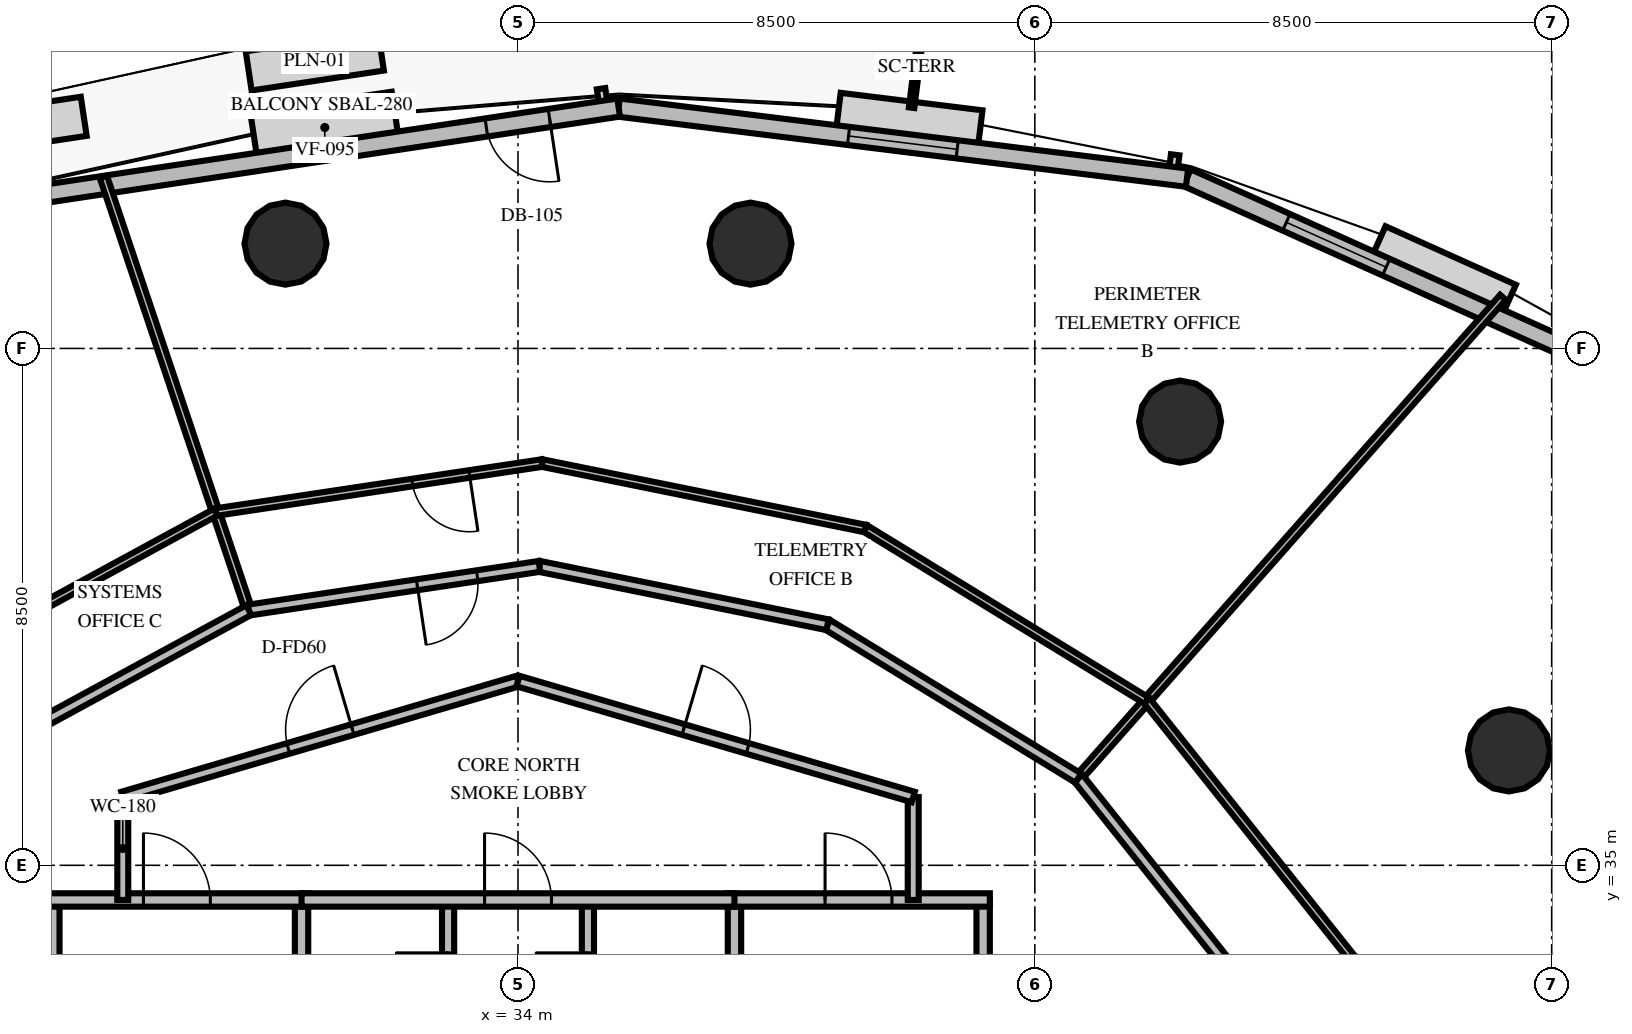
"""IFC4 building model, lengths in metres.
Left out: names, types, materials, properties, quantities, classifications, styles, units other than length and angle.
Written with IfcOpenShell. Run it as: python <this file> out.ifc"""

import sys

from ifc_helpers import new_model, si_unit, direction, frame, frame_2d, origin, origin_2d, place, context, subcontext, project, spatial, rectangle, circle, extrude, element, fill, save


model = new_model("IFC4")
c1 = context("Model", 3, precision=1e-05, world=origin(), true_north=direction((0.0, 1.0)))
c2 = subcontext(c1, "Body", "Model", "MODEL_VIEW")
j1 = project(units=[si_unit("LENGTHUNIT", "METRE"), si_unit("PLANEANGLEUNIT", "RADIAN")], contexts=[c1])
p1 = place(None, origin())
s1 = spatial("IfcSite", under=j1, at=p1, CompositionType="ELEMENT")
p2 = place(p1, origin())
s2 = spatial("IfcBuilding", under=s1, at=p2, CompositionType="ELEMENT")
p3 = place(p2, frame((0.0, 0.0, 67.8)))
s3 = spatial("IfcBuildingStorey", under=s2, at=p3, CompositionType="ELEMENT", Elevation=67.8)
for number, where, z_axis, x_axis in (
    (1, (50.297, 36.889, 0.0), (0.0, 0.0, 1.0), (1.0, 0.0, 0.0)),
    (2, (44.889, 42.297, 0.0), (0.0, 0.0, 1.0), (1.0, 0.0, 0.0)),
    (3, (37.824, 45.223, 0.0), (0.0, 0.0, 1.0), (1.0, 0.0, 0.0)),
    (4, (30.176, 45.223, 0.0), (0.0, 0.0, 1.0), (1.0, 0.0, 0.0)),
):
    element("IfcColumn", number, at=place(p3, frame(where, z_axis=z_axis, x_axis=x_axis)), inside=s3, PredefinedType="COLUMN", context=c2, shape_type="SweptSolid", body=[
        extrude(circle(Radius=0.675, at=origin_2d()), origin(), (0.0, 0.0, 1.0), 4.2),
    ])
p4 = place(p3, frame((53.024, 42.705, 0.0), z_axis=(0.0, 0.0, 1.0), x_axis=(-0.912205999873, 0.409731880376, 0.0)))
e5 = element("IfcWall", 5, at=p4, inside=s3, PredefinedType="SOLIDWALL", context=c2, shape_type="SweptSolid", body=[
    extrude(rectangle(XDim=8.792, YDim=0.3, at=frame_2d((4.396, 0.0))), origin(), (0.0, 0.0, 1.0), 3.0),
])
p5 = place(p4, frame((5.202, 0.0, 0.8)))
e6 = element("IfcOpeningElement", 6, at=p5, cuts=e5, PredefinedType="OPENING", context=c2, shape_type="SweptSolid", body=[
    extrude(rectangle(XDim=1.8, YDim=1.95, at=frame_2d((0.9, 0.975))), frame((0.0, 0.16, 0.0), z_axis=(0.0, -1.0, 0.0), x_axis=(1.0, 0.0, 0.0)), (0.0, 0.0, 1.0), 0.32),
])
p6 = place(p3, frame((45.003, 46.308, 0.0), z_axis=(0.0, 0.0, 1.0), x_axis=(-0.992477952792, 0.122423499466, 0.0)))
e7 = element("IfcWall", 7, at=p6, inside=s3, PredefinedType="SOLIDWALL", context=c2, shape_type="SweptSolid", body=[
    extrude(rectangle(XDim=9.419, YDim=0.3, at=frame_2d((4.709, 0.0))), origin(), (0.0, 0.0, 1.0), 3.0),
])
p7 = place(p6, frame((3.809, 0.0, 0.8)))
e8 = element("IfcOpeningElement", 8, at=p7, cuts=e7, PredefinedType="OPENING", context=c2, shape_type="SweptSolid", body=[
    extrude(rectangle(XDim=1.8, YDim=1.95, at=frame_2d((0.9, 0.975))), frame((0.0, 0.16, 0.0), z_axis=(0.0, -1.0, 0.0), x_axis=(1.0, 0.0, 0.0)), (0.0, 0.0, 1.0), 0.32),
])
p8 = place(p3, frame((35.655, 47.461, 0.0), z_axis=(0.0, 0.0, 1.0), x_axis=(-0.988888262402, -0.148660702551, 0.0)))
e9 = element("IfcWall", 9, at=p8, inside=s3, PredefinedType="SOLIDWALL", context=c2, shape_type="SweptSolid", body=[
    extrude(rectangle(XDim=9.655, YDim=0.3, at=frame_2d((4.827, 0.0))), origin(), (0.0, 0.0, 1.0), 3.0),
])
p9 = place(p8, frame((1.15, 0.0, 0.0)))
e10 = element("IfcOpeningElement", 10, at=p9, cuts=e9, PredefinedType="OPENING", context=c2, shape_type="SweptSolid", body=[
    extrude(rectangle(XDim=1.05, YDim=2.15, at=frame_2d((0.525, 1.075))), frame((0.0, 0.16, 0.0), z_axis=(0.0, -1.0, 0.0), x_axis=(1.0, 0.0, 0.0)), (0.0, 0.0, 1.0), 0.32),
])
p10 = place(p3, frame((26.35, 30.05, 0.0), z_axis=(0.0, 0.0, 1.0), x_axis=(0.0, 1.0, 0.0)))
e11 = element("IfcWall", 11, at=p10, inside=s3, PredefinedType="SOLIDWALL", context=c2, shape_type="SweptSolid", body=[
    extrude(rectangle(XDim=4.38, YDim=0.22, at=frame_2d((2.19, 0.0))), origin(), (0.0, 0.0, 1.0), 3.0),
])
p11 = place(p3, frame((30.44, 30.05, 0.0), z_axis=(0.0, 0.0, 1.0), x_axis=(0.0, 1.0, 0.0)))
e12 = element("IfcWall", 12, at=p11, inside=s3, PredefinedType="SOLIDWALL", context=c2, shape_type="SweptSolid", body=[
    extrude(rectangle(XDim=4.38, YDim=0.22, at=frame_2d((2.19, 0.0))), origin(), (0.0, 0.0, 1.0), 3.0),
])
p12 = place(p11, frame((0.8, 0.0, 0.0)))
e13 = element("IfcOpeningElement", 13, at=p12, cuts=e12, PredefinedType="OPENING", context=c2, shape_type="SweptSolid", body=[
    extrude(rectangle(XDim=1.05, YDim=2.1, at=frame_2d((0.525, 1.05))), frame((0.0, 0.12, 0.0), z_axis=(0.0, -1.0, 0.0), x_axis=(1.0, 0.0, 0.0)), (0.0, 0.0, 1.0), 0.24),
])
p13 = place(p3, frame((26.24, 34.43, 0.0), z_axis=(0.0, 0.0, 1.0), x_axis=(1.0, 0.0, 0.0)))
e14 = element("IfcWall", 14, at=p13, inside=s3, PredefinedType="SOLIDWALL", context=c2, shape_type="SweptSolid", body=[
    extrude(rectangle(XDim=4.31, YDim=0.22, at=frame_2d((2.155, 0.0))), origin(), (0.0, 0.0, 1.0), 3.0),
])
p14 = place(p13, frame((1.6, 0.0, 0.0)))
e15 = element("IfcOpeningElement", 15, at=p14, cuts=e14, PredefinedType="OPENING", context=c2, shape_type="SweptSolid", body=[
    extrude(rectangle(XDim=1.1, YDim=2.15, at=frame_2d((0.55, 1.075))), frame((0.0, 0.12, 0.0), z_axis=(0.0, -1.0, 0.0), x_axis=(1.0, 0.0, 0.0)), (0.0, 0.0, 1.0), 0.24),
])
p15 = place(p3, frame((32.85, 30.05, 0.0), z_axis=(0.0, 0.0, 1.0), x_axis=(0.0, 1.0, 0.0)))
e16 = element("IfcWall", 16, at=p15, inside=s3, PredefinedType="SOLIDWALL", context=c2, shape_type="SweptSolid", body=[
    extrude(rectangle(XDim=4.38, YDim=0.2, at=frame_2d((2.19, 0.0))), origin(), (0.0, 0.0, 1.0), 3.0),
])
p16 = place(p15, frame((2.65, 0.0, 0.0)))
e17 = element("IfcOpeningElement", 17, at=p16, cuts=e16, PredefinedType="OPENING", context=c2, shape_type="SweptSolid", body=[
    extrude(rectangle(XDim=0.86, YDim=2.05, at=frame_2d((0.43, 1.025))), frame((0.0, 0.11, 0.0), z_axis=(0.0, -1.0, 0.0), x_axis=(1.0, 0.0, 0.0)), (0.0, 0.0, 1.0), 0.22),
])
p17 = place(p3, frame((37.56, 30.05, 0.0), z_axis=(0.0, 0.0, 1.0), x_axis=(0.0, 1.0, 0.0)))
e18 = element("IfcWall", 18, at=p17, inside=s3, PredefinedType="SOLIDWALL", context=c2, shape_type="SweptSolid", body=[
    extrude(rectangle(XDim=4.38, YDim=0.22, at=frame_2d((2.19, 0.0))), origin(), (0.0, 0.0, 1.0), 3.0),
])
p18 = place(p17, frame((0.8, 0.0, 0.0)))
e19 = element("IfcOpeningElement", 19, at=p18, cuts=e18, PredefinedType="OPENING", context=c2, shape_type="SweptSolid", body=[
    extrude(rectangle(XDim=1.05, YDim=2.1, at=frame_2d((0.525, 1.05))), frame((0.0, 0.12, 0.0), z_axis=(0.0, -1.0, 0.0), x_axis=(1.0, 0.0, 0.0)), (0.0, 0.0, 1.0), 0.24),
])
p19 = place(p3, frame((41.65, 30.05, 0.0), z_axis=(0.0, 0.0, 1.0), x_axis=(0.0, 1.0, 0.0)))
e20 = element("IfcWall", 20, at=p19, inside=s3, PredefinedType="SOLIDWALL", context=c2, shape_type="SweptSolid", body=[
    extrude(rectangle(XDim=4.38, YDim=0.22, at=frame_2d((2.19, 0.0))), origin(), (0.0, 0.0, 1.0), 3.0),
])
p20 = place(p3, frame((37.45, 34.43, 0.0), z_axis=(0.0, 0.0, 1.0), x_axis=(1.0, 0.0, 0.0)))
e21 = element("IfcWall", 21, at=p20, inside=s3, PredefinedType="SOLIDWALL", context=c2, shape_type="SweptSolid", body=[
    extrude(rectangle(XDim=4.31, YDim=0.22, at=frame_2d((2.155, 0.0))), origin(), (0.0, 0.0, 1.0), 3.0),
])
p21 = place(p20, frame((1.6, 0.0, 0.0)))
e22 = element("IfcOpeningElement", 22, at=p21, cuts=e21, PredefinedType="OPENING", context=c2, shape_type="SweptSolid", body=[
    extrude(rectangle(XDim=1.1, YDim=2.15, at=frame_2d((0.55, 1.075))), frame((0.0, 0.12, 0.0), z_axis=(0.0, -1.0, 0.0), x_axis=(1.0, 0.0, 0.0)), (0.0, 0.0, 1.0), 0.24),
])
p22 = place(p3, frame((35.15, 30.05, 0.0), z_axis=(0.0, 0.0, 1.0), x_axis=(0.0, 1.0, 0.0)))
e23 = element("IfcWall", 23, at=p22, inside=s3, PredefinedType="SOLIDWALL", context=c2, shape_type="SweptSolid", body=[
    extrude(rectangle(XDim=4.38, YDim=0.2, at=frame_2d((2.19, 0.0))), origin(), (0.0, 0.0, 1.0), 3.0),
])
p23 = place(p22, frame((2.65, 0.0, 0.0)))
e24 = element("IfcOpeningElement", 24, at=p23, cuts=e23, PredefinedType="OPENING", context=c2, shape_type="SweptSolid", body=[
    extrude(rectangle(XDim=0.86, YDim=2.05, at=frame_2d((0.43, 1.025))), frame((0.0, 0.11, 0.0), z_axis=(0.0, -1.0, 0.0), x_axis=(1.0, 0.0, 0.0)), (0.0, 0.0, 1.0), 0.22),
])
p24 = place(p3, frame((30.44, 34.43, 0.0), z_axis=(0.0, 0.0, 1.0), x_axis=(1.0, 0.0, 0.0)))
e25 = element("IfcWall", 25, at=p24, inside=s3, PredefinedType="SOLIDWALL", context=c2, shape_type="SweptSolid", body=[
    extrude(rectangle(XDim=7.12, YDim=0.22, at=frame_2d((3.56, 0.0))), origin(), (0.0, 0.0, 1.0), 3.0),
])
p25 = place(p24, frame((3.01, 0.0, 0.0)))
e26 = element("IfcOpeningElement", 26, at=p25, cuts=e25, PredefinedType="OPENING", context=c2, shape_type="SweptSolid", body=[
    extrude(rectangle(XDim=1.1, YDim=2.15, at=frame_2d((0.55, 1.075))), frame((0.0, 0.12, 0.0), z_axis=(0.0, -1.0, 0.0), x_axis=(1.0, 0.0, 0.0)), (0.0, 0.0, 1.0), 0.24),
])
for number, where, z_axis, x_axis in (
    (27, (27.5, 34.43, 0.0), (0.0, 0.0, 1.0), (0.0, 1.0, 0.0)),
    (28, (40.5, 36.123, 0.0), (0.0, 0.0, 1.0), (0.0, -1.0, 0.0)),
):
    element("IfcWall", number, at=place(p3, frame(where, z_axis=z_axis, x_axis=x_axis)), inside=s3, PredefinedType="PARTITIONING", context=c2, shape_type="SweptSolid", body=[
        extrude(rectangle(XDim=1.693, YDim=0.18, at=frame_2d((0.846, 0.0))), origin(), (0.0, 0.0, 1.0), 3.0),
    ])
p26 = place(p3, frame((27.5, 36.123, 0.0), z_axis=(0.0, 0.0, 1.0), x_axis=(0.959546654541, 0.281549671923, 0.0)))
e29 = element("IfcWall", 29, at=p26, inside=s3, PredefinedType="PARTITIONING", context=c2, shape_type="SweptSolid", body=[
    extrude(rectangle(XDim=6.774, YDim=0.18, at=frame_2d((3.387, 0.0))), origin(), (0.0, 0.0, 1.0), 3.0),
])
p27 = place(p26, frame((2.837, 0.0, 0.0)))
e30 = element("IfcOpeningElement", 30, at=p27, cuts=e29, PredefinedType="OPENING", context=c2, shape_type="SweptSolid", body=[
    extrude(rectangle(XDim=1.1, YDim=2.15, at=frame_2d((0.55, 1.075))), frame((0.0, 0.1, 0.0), z_axis=(0.0, -1.0, 0.0), x_axis=(1.0, 0.0, 0.0)), (0.0, 0.0, 1.0), 0.2),
])
p28 = place(p3, frame((34.0, 38.03, 0.0), z_axis=(0.0, 0.0, 1.0), x_axis=(0.959546654541, -0.281549671923, 0.0)))
e31 = element("IfcWall", 31, at=p28, inside=s3, PredefinedType="PARTITIONING", context=c2, shape_type="SweptSolid", body=[
    extrude(rectangle(XDim=6.774, YDim=0.18, at=frame_2d((3.387, 0.0))), origin(), (0.0, 0.0, 1.0), 3.0),
])
p29 = place(p28, frame((2.837, 0.0, 0.0)))
e32 = element("IfcOpeningElement", 32, at=p29, cuts=e31, PredefinedType="OPENING", context=c2, shape_type="SweptSolid", body=[
    extrude(rectangle(XDim=1.1, YDim=2.15, at=frame_2d((0.55, 1.075))), frame((0.0, 0.1, 0.0), z_axis=(0.0, -1.0, 0.0), x_axis=(1.0, 0.0, 0.0)), (0.0, 0.0, 1.0), 0.2),
])
p30 = place(p3, frame((43.215, 36.434, 0.0), z_axis=(0.0, 0.0, 1.0), x_axis=(0.66196750906, 0.749532532282, 0.0)))
e33 = element("IfcWall", 33, at=p30, inside=s3, PredefinedType="PARTITIONING", context=c2, shape_type="SweptSolid", body=[
    extrude(rectangle(XDim=10.55, YDim=0.125, at=frame_2d((5.275, 0.0))), origin(), (0.0, 0.0, 1.0), 3.0),
])
p31 = place(p3, frame((46.227, 32.653, 0.0), z_axis=(0.0, 0.0, 1.0), x_axis=(-0.623166544039, 0.782089162685, 0.0)))
e34 = element("IfcWall", 34, at=p31, inside=s3, PredefinedType="PARTITIONING", context=c2, shape_type="SweptSolid", body=[
    extrude(rectangle(XDim=4.834, YDim=0.18, at=frame_2d((2.417, 0.0))), origin(), (0.0, 0.0, 1.0), 3.0),
])
p32 = place(p3, frame((47.721, 33.465, 0.0), z_axis=(0.0, 0.0, 1.0), x_axis=(-0.623201124623, 0.782061607719, 0.0)))
e35 = element("IfcWall", 35, at=p32, inside=s3, PredefinedType="PARTITIONING", context=c2, shape_type="SweptSolid", body=[
    extrude(rectangle(XDim=5.425, YDim=0.125, at=frame_2d((2.712, 0.0))), origin(), (0.0, 0.0, 1.0), 3.0),
])
p33 = place(p3, frame((29.572, 39.197, 0.0), z_axis=(0.0, 0.0, 1.0), x_axis=(-0.318127905721, 0.948047802382, 0.0)))
e36 = element("IfcWall", 36, at=p33, inside=s3, PredefinedType="PARTITIONING", context=c2, shape_type="SweptSolid", body=[
    extrude(rectangle(XDim=7.514, YDim=0.125, at=frame_2d((3.757, 0.0))), origin(), (0.0, 0.0, 1.0), 3.0),
])
p34 = place(p3, frame((43.215, 36.434, 0.0), z_axis=(0.0, 0.0, 1.0), x_axis=(-0.853113263306, 0.521725751685, 0.0)))
e37 = element("IfcWall", 37, at=p34, inside=s3, PredefinedType="PARTITIONING", context=c2, shape_type="SweptSolid", body=[
    extrude(rectangle(XDim=4.834, YDim=0.18, at=frame_2d((2.417, 0.0))), origin(), (0.0, 0.0, 1.0), 3.0),
])
p35 = place(p3, frame((39.09, 38.956, 0.0), z_axis=(0.0, 0.0, 1.0), x_axis=(-0.98009600445, 0.198524109522, 0.0)))
e38 = element("IfcWall", 38, at=p35, inside=s3, PredefinedType="PARTITIONING", context=c2, shape_type="SweptSolid", body=[
    extrude(rectangle(XDim=4.834, YDim=0.18, at=frame_2d((2.417, 0.0))), origin(), (0.0, 0.0, 1.0), 3.0),
])
p36 = place(p3, frame((34.352, 39.916, 0.0), z_axis=(0.0, 0.0, 1.0), x_axis=(-0.988886662028, -0.14867134782, 0.0)))
e39 = element("IfcWall", 39, at=p36, inside=s3, PredefinedType="PARTITIONING", context=c2, shape_type="SweptSolid", body=[
    extrude(rectangle(XDim=4.834, YDim=0.18, at=frame_2d((2.417, 0.0))), origin(), (0.0, 0.0, 1.0), 3.0),
])
p37 = place(p36, frame((1.034, 0.0, 0.0)))
e40 = element("IfcOpeningElement", 40, at=p37, cuts=e39, PredefinedType="OPENING", context=c2, shape_type="SweptSolid", body=[
    extrude(rectangle(XDim=1.0, YDim=2.15, at=frame_2d((0.5, 1.075))), frame((0.0, 0.1, 0.0), z_axis=(0.0, -1.0, 0.0), x_axis=(1.0, 0.0, 0.0)), (0.0, 0.0, 1.0), 0.2),
])
p38 = place(p3, frame((44.34, 37.708, 0.0), z_axis=(0.0, 0.0, 1.0), x_axis=(-0.853093763248, 0.521757636367, 0.0)))
e41 = element("IfcWall", 41, at=p38, inside=s3, PredefinedType="PARTITIONING", context=c2, shape_type="SweptSolid", body=[
    extrude(rectangle(XDim=5.425, YDim=0.125, at=frame_2d((2.712, 0.0))), origin(), (0.0, 0.0, 1.0), 3.0),
])
p39 = place(p3, frame((39.712, 40.538, 0.0), z_axis=(0.0, 0.0, 1.0), x_axis=(-0.980098278916, 0.198512880352, 0.0)))
e42 = element("IfcWall", 42, at=p39, inside=s3, PredefinedType="PARTITIONING", context=c2, shape_type="SweptSolid", body=[
    extrude(rectangle(XDim=5.425, YDim=0.125, at=frame_2d((2.712, 0.0))), origin(), (0.0, 0.0, 1.0), 3.0),
])
p40 = place(p3, frame((34.395, 41.615, 0.0), z_axis=(0.0, 0.0, 1.0), x_axis=(-0.988889758913, -0.148650747449, 0.0)))
e43 = element("IfcWall", 43, at=p40, inside=s3, PredefinedType="PARTITIONING", context=c2, shape_type="SweptSolid", body=[
    extrude(rectangle(XDim=5.425, YDim=0.125, at=frame_2d((2.712, 0.0))), origin(), (0.0, 0.0, 1.0), 3.0),
])
p41 = place(p40, frame((1.209, 0.0, 0.0)))
e44 = element("IfcOpeningElement", 44, at=p41, cuts=e43, PredefinedType="OPENING", context=c2, shape_type="SweptSolid", body=[
    extrude(rectangle(XDim=0.95, YDim=2.15, at=frame_2d((0.475, 1.075))), frame((0.0, 0.073, 0.0), z_axis=(0.0, -1.0, 0.0), x_axis=(1.0, 0.0, 0.0)), (0.0, 0.0, 1.0), 0.145),
])
p42 = place(p3, frame((29.572, 39.197, 0.0), z_axis=(0.0, 0.0, 1.0), x_axis=(-0.878385338365, -0.477953133001, 0.0)))
e45 = element("IfcWall", 45, at=p42, inside=s3, PredefinedType="PARTITIONING", context=c2, shape_type="SweptSolid", body=[
    extrude(rectangle(XDim=4.834, YDim=0.18, at=frame_2d((2.417, 0.0))), origin(), (0.0, 0.0, 1.0), 3.0),
])
p43 = place(p3, frame((29.031, 40.809, 0.0), z_axis=(0.0, 0.0, 1.0), x_axis=(-0.878390435216, -0.477943765857, 0.0)))
e46 = element("IfcWall", 46, at=p43, inside=s3, PredefinedType="PARTITIONING", context=c2, shape_type="SweptSolid", body=[
    extrude(rectangle(XDim=5.425, YDim=0.125, at=frame_2d((2.712, 0.0))), origin(), (0.0, 0.0, 1.0), 3.0),
])
p44 = place(p5, origin())
e47 = element("IfcWindow", 47, at=p44, inside=s3, PartitioningType="SINGLE_PANEL", PredefinedType="WINDOW", context=c2, shape_type="SweptSolid", body=[
    extrude(rectangle(XDim=1.8, YDim=1.95, at=frame_2d((0.9, 0.975))), frame((0.0, 0.03, 0.0), z_axis=(0.0, -1.0, 0.0), x_axis=(1.0, 0.0, 0.0)), (0.0, 0.0, 1.0), 0.06),
])
fill(e6, e47)
p45 = place(p7, origin())
e48 = element("IfcWindow", 48, at=p45, inside=s3, PartitioningType="SINGLE_PANEL", PredefinedType="WINDOW", context=c2, shape_type="SweptSolid", body=[
    extrude(rectangle(XDim=1.8, YDim=1.95, at=frame_2d((0.9, 0.975))), frame((0.0, 0.03, 0.0), z_axis=(0.0, -1.0, 0.0), x_axis=(1.0, 0.0, 0.0)), (0.0, 0.0, 1.0), 0.06),
])
fill(e8, e48)
p46 = place(p9, origin())
e49 = element("IfcDoor", 49, at=p46, inside=s3, OperationType="SINGLE_SWING_LEFT", PredefinedType="DOOR", context=c2, shape_type="SweptSolid", body=[
    extrude(rectangle(XDim=1.05, YDim=2.15, at=frame_2d((0.525, 1.075))), frame((0.0, 0.025, 0.0), z_axis=(0.0, -1.0, 0.0), x_axis=(1.0, 0.0, 0.0)), (0.0, 0.0, 1.0), 0.05),
])
fill(e10, e49)
p47 = place(p14, origin())
e50 = element("IfcDoor", 50, at=p47, inside=s3, OperationType="SINGLE_SWING_LEFT", PredefinedType="DOOR", context=c2, shape_type="SweptSolid", body=[
    extrude(rectangle(XDim=1.1, YDim=2.15, at=frame_2d((0.55, 1.075))), frame((0.0, 0.025, 0.0), z_axis=(0.0, -1.0, 0.0), x_axis=(1.0, 0.0, 0.0)), (0.0, 0.0, 1.0), 0.05),
])
fill(e15, e50)
p48 = place(p16, origin())
e51 = element("IfcDoor", 51, at=p48, inside=s3, OperationType="SINGLE_SWING_RIGHT", PredefinedType="TRAPDOOR", context=c2, shape_type="SweptSolid", body=[
    extrude(rectangle(XDim=0.86, YDim=2.05, at=frame_2d((0.43, 1.025))), frame((0.0, 0.025, 0.0), z_axis=(0.0, -1.0, 0.0), x_axis=(1.0, 0.0, 0.0)), (0.0, 0.0, 1.0), 0.05),
])
fill(e17, e51)
p49 = place(p21, origin())
e52 = element("IfcDoor", 52, at=p49, inside=s3, OperationType="SINGLE_SWING_LEFT", PredefinedType="DOOR", context=c2, shape_type="SweptSolid", body=[
    extrude(rectangle(XDim=1.1, YDim=2.15, at=frame_2d((0.55, 1.075))), frame((0.0, 0.025, 0.0), z_axis=(0.0, -1.0, 0.0), x_axis=(1.0, 0.0, 0.0)), (0.0, 0.0, 1.0), 0.05),
])
fill(e22, e52)
p50 = place(p23, origin())
e53 = element("IfcDoor", 53, at=p50, inside=s3, OperationType="SINGLE_SWING_RIGHT", PredefinedType="TRAPDOOR", context=c2, shape_type="SweptSolid", body=[
    extrude(rectangle(XDim=0.86, YDim=2.05, at=frame_2d((0.43, 1.025))), frame((0.0, 0.025, 0.0), z_axis=(0.0, -1.0, 0.0), x_axis=(1.0, 0.0, 0.0)), (0.0, 0.0, 1.0), 0.05),
])
fill(e24, e53)
p51 = place(p25, origin())
e54 = element("IfcDoor", 54, at=p51, inside=s3, OperationType="SINGLE_SWING_LEFT", PredefinedType="DOOR", context=c2, shape_type="SweptSolid", body=[
    extrude(rectangle(XDim=1.1, YDim=2.15, at=frame_2d((0.55, 1.075))), frame((0.0, 0.025, 0.0), z_axis=(0.0, -1.0, 0.0), x_axis=(1.0, 0.0, 0.0)), (0.0, 0.0, 1.0), 0.05),
])
fill(e26, e54)
p52 = place(p27, origin())
e55 = element("IfcDoor", 55, at=p52, inside=s3, OperationType="SINGLE_SWING_RIGHT", PredefinedType="DOOR", context=c2, shape_type="SweptSolid", body=[
    extrude(rectangle(XDim=1.1, YDim=2.15, at=frame_2d((0.55, 1.075))), frame((0.0, 0.025, 0.0), z_axis=(0.0, -1.0, 0.0), x_axis=(1.0, 0.0, 0.0)), (0.0, 0.0, 1.0), 0.05),
])
fill(e30, e55)
p53 = place(p29, origin())
e56 = element("IfcDoor", 56, at=p53, inside=s3, OperationType="SINGLE_SWING_LEFT", PredefinedType="DOOR", context=c2, shape_type="SweptSolid", body=[
    extrude(rectangle(XDim=1.1, YDim=2.15, at=frame_2d((0.55, 1.075))), frame((0.0, 0.025, 0.0), z_axis=(0.0, -1.0, 0.0), x_axis=(1.0, 0.0, 0.0)), (0.0, 0.0, 1.0), 0.05),
])
fill(e32, e56)
p54 = place(p37, origin())
e57 = element("IfcDoor", 57, at=p54, inside=s3, OperationType="SINGLE_SWING_RIGHT", PredefinedType="DOOR", context=c2, shape_type="SweptSolid", body=[
    extrude(rectangle(XDim=1.0, YDim=2.15, at=frame_2d((0.5, 1.075))), frame((0.0, 0.025, 0.0), z_axis=(0.0, -1.0, 0.0), x_axis=(1.0, 0.0, 0.0)), (0.0, 0.0, 1.0), 0.05),
])
fill(e40, e57)
p55 = place(p41, origin())
e58 = element("IfcDoor", 58, at=p55, inside=s3, OperationType="SINGLE_SWING_LEFT", PredefinedType="DOOR", context=c2, shape_type="SweptSolid", body=[
    extrude(rectangle(XDim=0.95, YDim=2.15, at=frame_2d((0.475, 1.075))), frame((0.0, 0.025, 0.0), z_axis=(0.0, -1.0, 0.0), x_axis=(1.0, 0.0, 0.0)), (0.0, 0.0, 1.0), 0.05),
])
fill(e44, e58)
save(model, sys.argv[1])
